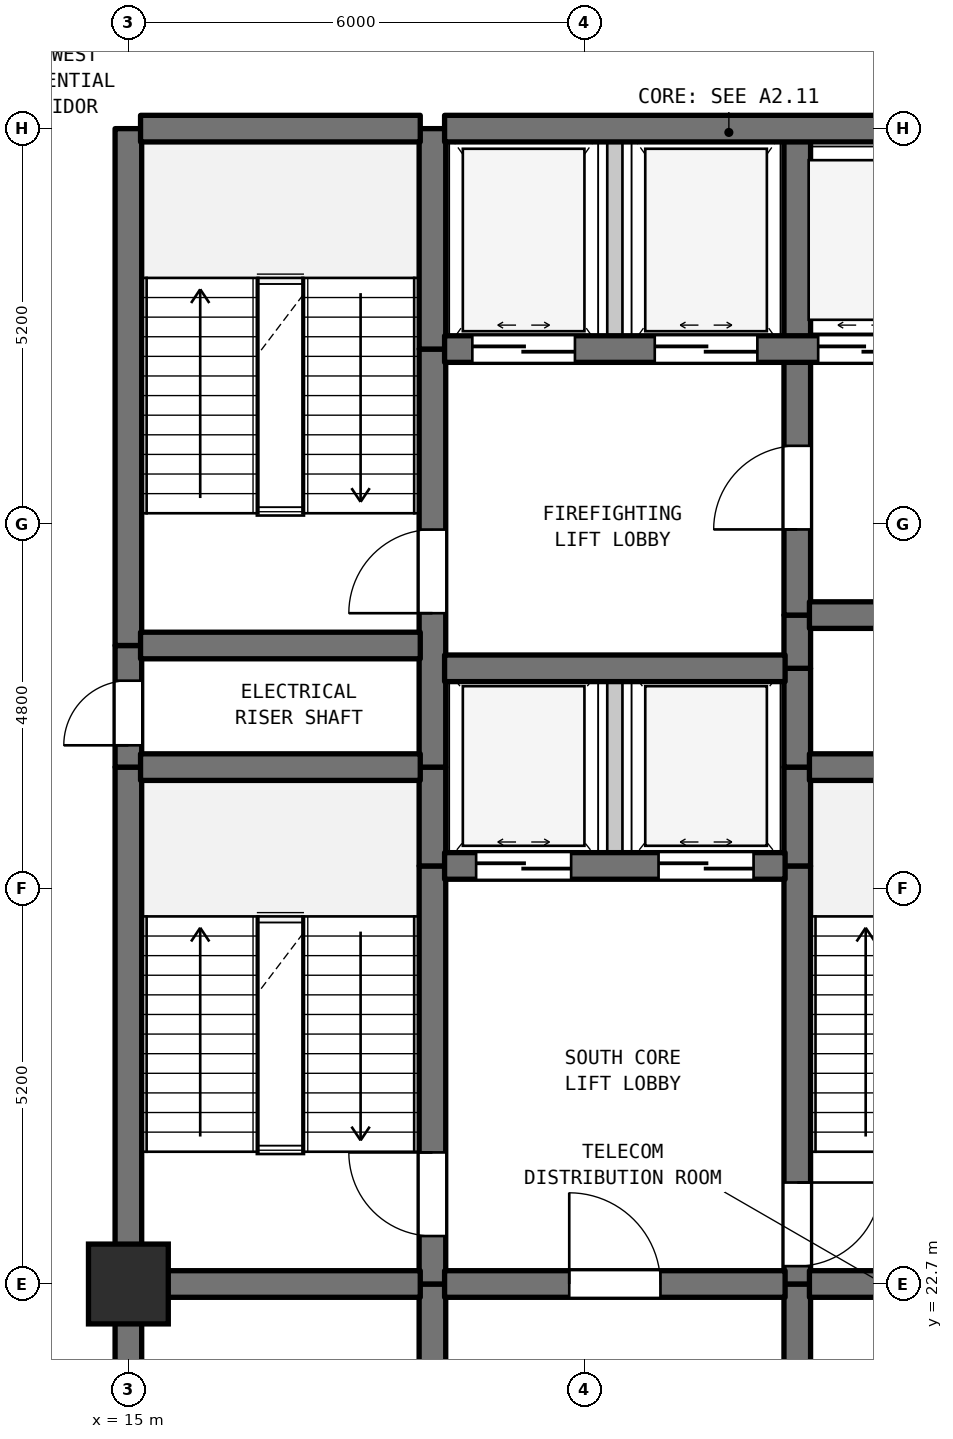
"""IFC4 building model, lengths in metres.
Left out: names, types, materials, properties, quantities, classifications, styles, units other than length and angle.
Written with IfcOpenShell. Run it as: python <this file> out.ifc"""

import sys

from ifc_helpers import new_model, si_unit, direction, frame, frame_2d, origin, origin_2d, place, context, subcontext, project, spatial, rectangle, extrude, element, fill, save


model = new_model("IFC4")
c1 = context("Model", 3, precision=1e-05, world=origin(), true_north=direction((0.0, 1.0)))
c2 = subcontext(c1, "Body", "Model", "MODEL_VIEW")
j1 = project(units=[si_unit("LENGTHUNIT", "METRE"), si_unit("PLANEANGLEUNIT", "RADIAN")], contexts=[c1])
p1 = place(None, origin())
s1 = spatial("IfcSite", under=j1, at=p1, CompositionType="ELEMENT")
p2 = place(p1, origin())
s2 = spatial("IfcBuilding", under=s1, at=p2, CompositionType="ELEMENT")
p3 = place(p2, frame((0.0, 0.0, 120.5)))
s3 = spatial("IfcBuildingStorey", under=s2, at=p3, CompositionType="ELEMENT", Elevation=120.5)
p4 = place(p3, frame((15.0, 22.7, 0.0), z_axis=(0.0, 0.0, 1.0), x_axis=(1.0, 0.0, 0.0)))
e1 = element("IfcColumn", 1, at=p4, inside=s3, PredefinedType="COLUMN", context=c2, shape_type="SweptSolid", body=[
    extrude(rectangle(XDim=1.05, YDim=1.05, at=origin_2d()), origin(), (0.0, 0.0, 1.0), 4.8),
])
p5 = place(p3, frame((15.0, 19.5, 0.0), z_axis=(0.0, 0.0, 1.0), x_axis=(0.0, 1.0, 0.0)))
e2 = element("IfcWall", 2, at=p5, inside=s3, PredefinedType="SHEAR", context=c2, shape_type="SweptSolid", body=[
    extrude(rectangle(XDim=3.2, YDim=0.35, at=frame_2d((1.6, 0.0))), origin(), (0.0, 0.0, 1.0), 4.48),
])
p6 = place(p3, frame((15.0, 22.7, 0.0), z_axis=(0.0, 0.0, 1.0), x_axis=(0.0, 1.0, 0.0)))
e3 = element("IfcWall", 3, at=p6, inside=s3, PredefinedType="SHEAR", context=c2, shape_type="SweptSolid", body=[
    extrude(rectangle(XDim=6.8, YDim=0.35, at=frame_2d((3.4, 0.0))), origin(), (0.0, 0.0, 1.0), 4.48),
])
p7 = place(p3, frame((15.0, 29.5, 0.0), z_axis=(0.0, 0.0, 1.0), x_axis=(0.0, 1.0, 0.0)))
e4 = element("IfcWall", 4, at=p7, inside=s3, PredefinedType="SHEAR", context=c2, shape_type="SweptSolid", body=[
    extrude(rectangle(XDim=1.6, YDim=0.35, at=frame_2d((0.8, 0.0))), origin(), (0.0, 0.0, 1.0), 4.48),
])
p8 = place(p7, frame((0.287, 0.0, 0.0)))
e5 = element("IfcOpeningElement", 5, at=p8, cuts=e4, PredefinedType="OPENING", context=c2, shape_type="SweptSolid", body=[
    extrude(rectangle(XDim=0.85, YDim=2.1, at=frame_2d((0.425, 1.05))), frame((0.0, 0.185, 0.0), z_axis=(0.0, -1.0, 0.0), x_axis=(1.0, 0.0, 0.0)), (0.0, 0.0, 1.0), 0.37),
])
p9 = place(p3, frame((15.0, 31.1, 0.0), z_axis=(0.0, 0.0, 1.0), x_axis=(0.0, 1.0, 0.0)))
e6 = element("IfcWall", 6, at=p9, inside=s3, PredefinedType="SHEAR", context=c2, shape_type="SweptSolid", body=[
    extrude(rectangle(XDim=6.8, YDim=0.35, at=frame_2d((3.4, 0.0))), origin(), (0.0, 0.0, 1.0), 4.48),
])
p10 = place(p3, frame((19.0, 19.5, 0.0), z_axis=(0.0, 0.0, 1.0), x_axis=(0.0, 1.0, 0.0)))
e7 = element("IfcWall", 7, at=p10, inside=s3, PredefinedType="SHEAR", context=c2, shape_type="SweptSolid", body=[
    extrude(rectangle(XDim=3.2, YDim=0.35, at=frame_2d((1.6, 0.0))), origin(), (0.0, 0.0, 1.0), 4.48),
])
p11 = place(p3, frame((19.0, 22.7, 0.0), z_axis=(0.0, 0.0, 1.0), x_axis=(0.0, 1.0, 0.0)))
e8 = element("IfcWall", 8, at=p11, inside=s3, PredefinedType="SHEAR", context=c2, shape_type="SweptSolid", body=[
    extrude(rectangle(XDim=5.5, YDim=0.35, at=frame_2d((2.75, 0.0))), origin(), (0.0, 0.0, 1.0), 4.48),
])
p12 = place(p11, frame((0.631, 0.0, 0.0)))
e9 = element("IfcOpeningElement", 9, at=p12, cuts=e8, PredefinedType="OPENING", context=c2, shape_type="SweptSolid", body=[
    extrude(rectangle(XDim=1.1, YDim=2.15, at=frame_2d((0.55, 1.075))), frame((0.0, 0.185, 0.0), z_axis=(0.0, -1.0, 0.0), x_axis=(1.0, 0.0, 0.0)), (0.0, 0.0, 1.0), 0.37),
])
p13 = place(p3, frame((19.0, 28.2, 0.0), z_axis=(0.0, 0.0, 1.0), x_axis=(0.0, 1.0, 0.0)))
e10 = element("IfcWall", 10, at=p13, inside=s3, PredefinedType="SHEAR", context=c2, shape_type="SweptSolid", body=[
    extrude(rectangle(XDim=1.3, YDim=0.35, at=frame_2d((0.65, 0.0))), origin(), (0.0, 0.0, 1.0), 4.48),
])
p14 = place(p3, frame((19.0, 29.5, 0.0), z_axis=(0.0, 0.0, 1.0), x_axis=(0.0, 1.0, 0.0)))
e11 = element("IfcWall", 11, at=p14, inside=s3, PredefinedType="SHEAR", context=c2, shape_type="SweptSolid", body=[
    extrude(rectangle(XDim=5.5, YDim=0.35, at=frame_2d((2.75, 0.0))), origin(), (0.0, 0.0, 1.0), 4.48),
])
p15 = place(p14, frame((2.025, 0.0, 0.0)))
e12 = element("IfcOpeningElement", 12, at=p15, cuts=e11, PredefinedType="OPENING", context=c2, shape_type="SweptSolid", body=[
    extrude(rectangle(XDim=1.1, YDim=2.15, at=frame_2d((0.55, 1.075))), frame((0.0, 0.185, 0.0), z_axis=(0.0, -1.0, 0.0), x_axis=(1.0, 0.0, 0.0)), (0.0, 0.0, 1.0), 0.37),
])
p16 = place(p3, frame((19.0, 35.0, 0.0), z_axis=(0.0, 0.0, 1.0), x_axis=(0.0, 1.0, 0.0)))
e13 = element("IfcWall", 13, at=p16, inside=s3, PredefinedType="SHEAR", context=c2, shape_type="SweptSolid", body=[
    extrude(rectangle(XDim=2.9, YDim=0.35, at=frame_2d((1.45, 0.0))), origin(), (0.0, 0.0, 1.0), 4.48),
])
p17 = place(p3, frame((21.4, 28.2, 0.0), z_axis=(0.0, 0.0, 1.0), x_axis=(0.0, 1.0, 0.0)))
e14 = element("IfcWall", 14, at=p17, inside=s3, PredefinedType="STANDARD", context=c2, shape_type="SweptSolid", body=[
    extrude(rectangle(XDim=2.6, YDim=0.2, at=frame_2d((1.3, 0.0))), origin(), (0.0, 0.0, 1.0), 4.48),
])
p18 = place(p3, frame((21.4, 35.0, 0.0), z_axis=(0.0, 0.0, 1.0), x_axis=(0.0, 1.0, 0.0)))
e15 = element("IfcWall", 15, at=p18, inside=s3, PredefinedType="STANDARD", context=c2, shape_type="SweptSolid", body=[
    extrude(rectangle(XDim=2.9, YDim=0.2, at=frame_2d((1.45, 0.0))), origin(), (0.0, 0.0, 1.0), 4.48),
])
p19 = place(p3, frame((23.8, 19.5, 0.0), z_axis=(0.0, 0.0, 1.0), x_axis=(0.0, 1.0, 0.0)))
e16 = element("IfcWall", 16, at=p19, inside=s3, PredefinedType="SHEAR", context=c2, shape_type="SweptSolid", body=[
    extrude(rectangle(XDim=3.2, YDim=0.35, at=frame_2d((1.6, 0.0))), origin(), (0.0, 0.0, 1.0), 4.48),
])
p20 = place(p3, frame((23.8, 22.7, 0.0), z_axis=(0.0, 0.0, 1.0), x_axis=(0.0, 1.0, 0.0)))
e17 = element("IfcWall", 17, at=p20, inside=s3, PredefinedType="SHEAR", context=c2, shape_type="SweptSolid", body=[
    extrude(rectangle(XDim=5.5, YDim=0.35, at=frame_2d((2.75, 0.0))), origin(), (0.0, 0.0, 1.0), 4.48),
])
p21 = place(p20, frame((0.235, 0.0, 0.0)))
e18 = element("IfcOpeningElement", 18, at=p21, cuts=e17, PredefinedType="OPENING", context=c2, shape_type="SweptSolid", body=[
    extrude(rectangle(XDim=1.1, YDim=2.15, at=frame_2d((0.55, 1.075))), frame((0.0, 0.185, 0.0), z_axis=(0.0, -1.0, 0.0), x_axis=(1.0, 0.0, 0.0)), (0.0, 0.0, 1.0), 0.37),
])
for number, where, z_axis, x_axis in (
    (19, (23.8, 28.2, 0.0), (0.0, 0.0, 1.0), (0.0, 1.0, 0.0)),
    (20, (23.8, 29.5, 0.0), (0.0, 0.0, 1.0), (0.0, 1.0, 0.0)),
):
    element("IfcWall", number, at=place(p3, frame(where, z_axis=z_axis, x_axis=x_axis)), inside=s3, PredefinedType="SHEAR", context=c2, shape_type="SweptSolid", body=[
        extrude(rectangle(XDim=1.3, YDim=0.35, at=frame_2d((0.65, 0.0))), origin(), (0.0, 0.0, 1.0), 4.48),
    ])
p22 = place(p3, frame((23.8, 30.8, 0.0), z_axis=(0.0, 0.0, 1.0), x_axis=(0.0, 1.0, 0.0)))
e21 = element("IfcWall", 21, at=p22, inside=s3, PredefinedType="SHEAR", context=c2, shape_type="SweptSolid", body=[
    extrude(rectangle(XDim=0.7, YDim=0.35, at=frame_2d((0.35, 0.0))), origin(), (0.0, 0.0, 1.0), 4.48),
])
p23 = place(p3, frame((23.8, 31.5, 0.0), z_axis=(0.0, 0.0, 1.0), x_axis=(0.0, 1.0, 0.0)))
e22 = element("IfcWall", 22, at=p23, inside=s3, PredefinedType="SHEAR", context=c2, shape_type="SweptSolid", body=[
    extrude(rectangle(XDim=3.5, YDim=0.35, at=frame_2d((1.75, 0.0))), origin(), (0.0, 0.0, 1.0), 4.48),
])
p24 = place(p23, frame((1.127, 0.0, 0.0)))
e23 = element("IfcOpeningElement", 23, at=p24, cuts=e22, PredefinedType="OPENING", context=c2, shape_type="SweptSolid", body=[
    extrude(rectangle(XDim=1.1, YDim=2.15, at=frame_2d((0.55, 1.075))), frame((0.0, 0.185, 0.0), z_axis=(0.0, -1.0, 0.0), x_axis=(1.0, 0.0, 0.0)), (0.0, 0.0, 1.0), 0.37),
])
p25 = place(p3, frame((23.8, 35.0, 0.0), z_axis=(0.0, 0.0, 1.0), x_axis=(0.0, 1.0, 0.0)))
e24 = element("IfcWall", 24, at=p25, inside=s3, PredefinedType="SHEAR", context=c2, shape_type="SweptSolid", body=[
    extrude(rectangle(XDim=2.9, YDim=0.35, at=frame_2d((1.45, 0.0))), origin(), (0.0, 0.0, 1.0), 4.48),
])
p26 = place(p3, frame((15.16, 22.7, 0.0), z_axis=(0.0, 0.0, 1.0), x_axis=(1.0, 0.0, 0.0)))
e25 = element("IfcWall", 25, at=p26, inside=s3, PredefinedType="SHEAR", context=c2, shape_type="SweptSolid", body=[
    extrude(rectangle(XDim=3.68, YDim=0.35, at=frame_2d((1.84, 0.0))), origin(), (0.0, 0.0, 1.0), 4.48),
])
p27 = place(p3, frame((19.16, 22.7, 0.0), z_axis=(0.0, 0.0, 1.0), x_axis=(1.0, 0.0, 0.0)))
e26 = element("IfcWall", 26, at=p27, inside=s3, PredefinedType="SHEAR", context=c2, shape_type="SweptSolid", body=[
    extrude(rectangle(XDim=4.48, YDim=0.35, at=frame_2d((2.24, 0.0))), origin(), (0.0, 0.0, 1.0), 4.48),
])
p28 = place(p27, frame((1.64, 0.0, 0.0)))
e27 = element("IfcOpeningElement", 27, at=p28, cuts=e26, PredefinedType="OPENING", context=c2, shape_type="SweptSolid", body=[
    extrude(rectangle(XDim=1.2, YDim=2.2, at=frame_2d((0.6, 1.1))), frame((0.0, 0.185, 0.0), z_axis=(0.0, -1.0, 0.0), x_axis=(1.0, 0.0, 0.0)), (0.0, 0.0, 1.0), 0.37),
])
p29 = place(p3, frame((23.96, 22.7, 0.0), z_axis=(0.0, 0.0, 1.0), x_axis=(1.0, 0.0, 0.0)))
e28 = element("IfcWall", 28, at=p29, inside=s3, PredefinedType="SHEAR", context=c2, shape_type="SweptSolid", body=[
    extrude(rectangle(XDim=3.18, YDim=0.35, at=frame_2d((1.59, 0.0))), origin(), (0.0, 0.0, 1.0), 4.48),
])
p30 = place(p3, frame((19.16, 28.2, 0.0), z_axis=(0.0, 0.0, 1.0), x_axis=(1.0, 0.0, 0.0)))
e29 = element("IfcWall", 29, at=p30, inside=s3, PredefinedType="SHEAR", context=c2, shape_type="SweptSolid", body=[
    extrude(rectangle(XDim=4.48, YDim=0.35, at=frame_2d((2.24, 0.0))), origin(), (0.0, 0.0, 1.0), 4.48),
])
p31 = place(p30, frame((0.415, 0.0, 0.0)))
e30 = element("IfcOpeningElement", 30, at=p31, cuts=e29, PredefinedType="OPENING", context=c2, shape_type="SweptSolid", body=[
    extrude(rectangle(XDim=1.25, YDim=2.2, at=frame_2d((0.625, 1.1))), frame((0.0, 0.185, 0.0), z_axis=(0.0, -1.0, 0.0), x_axis=(1.0, 0.0, 0.0)), (0.0, 0.0, 1.0), 0.37),
])
p32 = place(p30, frame((2.815, 0.0, 0.0)))
e31 = element("IfcOpeningElement", 31, at=p32, cuts=e29, PredefinedType="OPENING", context=c2, shape_type="SweptSolid", body=[
    extrude(rectangle(XDim=1.25, YDim=2.2, at=frame_2d((0.625, 1.1))), frame((0.0, 0.185, 0.0), z_axis=(0.0, -1.0, 0.0), x_axis=(1.0, 0.0, 0.0)), (0.0, 0.0, 1.0), 0.37),
])
p33 = place(p3, frame((15.16, 29.5, 0.0), z_axis=(0.0, 0.0, 1.0), x_axis=(1.0, 0.0, 0.0)))
e32 = element("IfcWall", 32, at=p33, inside=s3, PredefinedType="SHEAR", context=c2, shape_type="SweptSolid", body=[
    extrude(rectangle(XDim=3.68, YDim=0.35, at=frame_2d((1.84, 0.0))), origin(), (0.0, 0.0, 1.0), 4.48),
])
p34 = place(p3, frame((23.96, 29.5, 0.0), z_axis=(0.0, 0.0, 1.0), x_axis=(1.0, 0.0, 0.0)))
e33 = element("IfcWall", 33, at=p34, inside=s3, PredefinedType="SHEAR", context=c2, shape_type="SweptSolid", body=[
    extrude(rectangle(XDim=3.18, YDim=0.35, at=frame_2d((1.59, 0.0))), origin(), (0.0, 0.0, 1.0), 4.48),
])
p35 = place(p3, frame((19.16, 30.8, 0.0), z_axis=(0.0, 0.0, 1.0), x_axis=(1.0, 0.0, 0.0)))
e34 = element("IfcWall", 34, at=p35, inside=s3, PredefinedType="SHEAR", context=c2, shape_type="SweptSolid", body=[
    extrude(rectangle(XDim=4.48, YDim=0.35, at=frame_2d((2.24, 0.0))), origin(), (0.0, 0.0, 1.0), 4.48),
])
p36 = place(p3, frame((15.16, 31.1, 0.0), z_axis=(0.0, 0.0, 1.0), x_axis=(1.0, 0.0, 0.0)))
e35 = element("IfcWall", 35, at=p36, inside=s3, PredefinedType="SHEAR", context=c2, shape_type="SweptSolid", body=[
    extrude(rectangle(XDim=3.68, YDim=0.35, at=frame_2d((1.84, 0.0))), origin(), (0.0, 0.0, 1.0), 4.48),
])
p37 = place(p3, frame((23.96, 31.5, 0.0), z_axis=(0.0, 0.0, 1.0), x_axis=(1.0, 0.0, 0.0)))
e36 = element("IfcWall", 36, at=p37, inside=s3, PredefinedType="SHEAR", context=c2, shape_type="SweptSolid", body=[
    extrude(rectangle(XDim=3.18, YDim=0.35, at=frame_2d((1.59, 0.0))), origin(), (0.0, 0.0, 1.0), 4.48),
])
p38 = place(p37, frame((1.094, 0.0, 0.0)))
e37 = element("IfcOpeningElement", 37, at=p38, cuts=e36, PredefinedType="OPENING", context=c2, shape_type="SweptSolid", body=[
    extrude(rectangle(XDim=0.85, YDim=2.1, at=frame_2d((0.425, 1.05))), frame((0.0, 0.185, 0.0), z_axis=(0.0, -1.0, 0.0), x_axis=(1.0, 0.0, 0.0)), (0.0, 0.0, 1.0), 0.37),
])
p39 = place(p3, frame((19.16, 35.0, 0.0), z_axis=(0.0, 0.0, 1.0), x_axis=(1.0, 0.0, 0.0)))
e38 = element("IfcWall", 38, at=p39, inside=s3, PredefinedType="SHEAR", context=c2, shape_type="SweptSolid", body=[
    extrude(rectangle(XDim=11.48, YDim=0.35, at=frame_2d((5.74, 0.0))), origin(), (0.0, 0.0, 1.0), 4.48),
])
p40 = place(p39, frame((0.365, 0.0, 0.0)))
e39 = element("IfcOpeningElement", 39, at=p40, cuts=e38, PredefinedType="OPENING", context=c2, shape_type="SweptSolid", body=[
    extrude(rectangle(XDim=1.35, YDim=2.2, at=frame_2d((0.675, 1.1))), frame((0.0, 0.185, 0.0), z_axis=(0.0, -1.0, 0.0), x_axis=(1.0, 0.0, 0.0)), (0.0, 0.0, 1.0), 0.37),
])
p41 = place(p39, frame((2.765, 0.0, 0.0)))
e40 = element("IfcOpeningElement", 40, at=p41, cuts=e38, PredefinedType="OPENING", context=c2, shape_type="SweptSolid", body=[
    extrude(rectangle(XDim=1.35, YDim=2.2, at=frame_2d((0.675, 1.1))), frame((0.0, 0.185, 0.0), z_axis=(0.0, -1.0, 0.0), x_axis=(1.0, 0.0, 0.0)), (0.0, 0.0, 1.0), 0.37),
])
p42 = place(p39, frame((4.915, 0.0, 0.0)))
e41 = element("IfcOpeningElement", 41, at=p42, cuts=e38, PredefinedType="OPENING", context=c2, shape_type="SweptSolid", body=[
    extrude(rectangle(XDim=1.2, YDim=2.2, at=frame_2d((0.6, 1.1))), frame((0.0, 0.185, 0.0), z_axis=(0.0, -1.0, 0.0), x_axis=(1.0, 0.0, 0.0)), (0.0, 0.0, 1.0), 0.37),
])
p43 = place(p39, frame((6.665, 0.0, 0.0)))
e42 = element("IfcOpeningElement", 42, at=p43, cuts=e38, PredefinedType="OPENING", context=c2, shape_type="SweptSolid", body=[
    extrude(rectangle(XDim=1.2, YDim=2.2, at=frame_2d((0.6, 1.1))), frame((0.0, 0.185, 0.0), z_axis=(0.0, -1.0, 0.0), x_axis=(1.0, 0.0, 0.0)), (0.0, 0.0, 1.0), 0.37),
])
p44 = place(p39, frame((8.415, 0.0, 0.0)))
e43 = element("IfcOpeningElement", 43, at=p44, cuts=e38, PredefinedType="OPENING", context=c2, shape_type="SweptSolid", body=[
    extrude(rectangle(XDim=1.2, YDim=2.2, at=frame_2d((0.6, 1.1))), frame((0.0, 0.185, 0.0), z_axis=(0.0, -1.0, 0.0), x_axis=(1.0, 0.0, 0.0)), (0.0, 0.0, 1.0), 0.37),
])
p45 = place(p39, frame((10.16, 0.0, 0.0)))
e44 = element("IfcOpeningElement", 44, at=p45, cuts=e38, PredefinedType="OPENING", context=c2, shape_type="SweptSolid", body=[
    extrude(rectangle(XDim=1.2, YDim=2.2, at=frame_2d((0.6, 1.1))), frame((0.0, 0.185, 0.0), z_axis=(0.0, -1.0, 0.0), x_axis=(1.0, 0.0, 0.0)), (0.0, 0.0, 1.0), 0.37),
])
p46 = place(p3, frame((15.16, 37.9, 0.0), z_axis=(0.0, 0.0, 1.0), x_axis=(1.0, 0.0, 0.0)))
e45 = element("IfcWall", 45, at=p46, inside=s3, PredefinedType="SHEAR", context=c2, shape_type="SweptSolid", body=[
    extrude(rectangle(XDim=3.68, YDim=0.35, at=frame_2d((1.84, 0.0))), origin(), (0.0, 0.0, 1.0), 4.48),
])
p47 = place(p3, frame((19.16, 37.9, 0.0), z_axis=(0.0, 0.0, 1.0), x_axis=(1.0, 0.0, 0.0)))
e46 = element("IfcWall", 46, at=p47, inside=s3, PredefinedType="SHEAR", context=c2, shape_type="SweptSolid", body=[
    extrude(rectangle(XDim=11.48, YDim=0.35, at=frame_2d((5.74, 0.0))), origin(), (0.0, 0.0, 1.0), 4.48),
])
p48 = place(p8, origin())
e47 = element("IfcDoor", 47, at=p48, inside=s3, OperationType="SINGLE_SWING_LEFT", PredefinedType="DOOR", context=c2, shape_type="SweptSolid", body=[
    extrude(rectangle(XDim=0.85, YDim=2.1, at=frame_2d((0.425, 1.05))), frame((0.0, 0.025, 0.0), z_axis=(0.0, -1.0, 0.0), x_axis=(1.0, 0.0, 0.0)), (0.0, 0.0, 1.0), 0.05),
])
fill(e5, e47)
p49 = place(p12, origin())
e48 = element("IfcDoor", 48, at=p49, inside=s3, OperationType="SINGLE_SWING_RIGHT", PredefinedType="DOOR", context=c2, shape_type="SweptSolid", body=[
    extrude(rectangle(XDim=1.1, YDim=2.15, at=frame_2d((0.55, 1.075))), frame((0.0, 0.025, 0.0), z_axis=(0.0, -1.0, 0.0), x_axis=(1.0, 0.0, 0.0)), (0.0, 0.0, 1.0), 0.05),
])
fill(e9, e48)
p50 = place(p15, origin())
e49 = element("IfcDoor", 49, at=p50, inside=s3, OperationType="SINGLE_SWING_LEFT", PredefinedType="DOOR", context=c2, shape_type="SweptSolid", body=[
    extrude(rectangle(XDim=1.1, YDim=2.15, at=frame_2d((0.55, 1.075))), frame((0.0, 0.025, 0.0), z_axis=(0.0, -1.0, 0.0), x_axis=(1.0, 0.0, 0.0)), (0.0, 0.0, 1.0), 0.05),
])
fill(e12, e49)
p51 = place(p21, frame((1.1, 0.0, 0.0), z_axis=(0.0, 0.0, 1.0), x_axis=(-1.0, 0.0, 0.0)))
e50 = element("IfcDoor", 50, at=p51, inside=s3, OperationType="SINGLE_SWING_RIGHT", PredefinedType="DOOR", context=c2, shape_type="SweptSolid", body=[
    extrude(rectangle(XDim=1.1, YDim=2.15, at=frame_2d((0.55, 1.075))), frame((0.0, 0.025, 0.0), z_axis=(0.0, -1.0, 0.0), x_axis=(1.0, 0.0, 0.0)), (0.0, 0.0, 1.0), 0.05),
])
fill(e18, e50)
p52 = place(p24, origin())
e51 = element("IfcDoor", 51, at=p52, inside=s3, OperationType="SINGLE_SWING_LEFT", PredefinedType="DOOR", context=c2, shape_type="SweptSolid", body=[
    extrude(rectangle(XDim=1.1, YDim=2.15, at=frame_2d((0.55, 1.075))), frame((0.0, 0.025, 0.0), z_axis=(0.0, -1.0, 0.0), x_axis=(1.0, 0.0, 0.0)), (0.0, 0.0, 1.0), 0.05),
])
fill(e23, e51)
p53 = place(p28, origin())
e52 = element("IfcDoor", 52, at=p53, inside=s3, OperationType="SINGLE_SWING_LEFT", PredefinedType="DOOR", context=c2, shape_type="SweptSolid", body=[
    extrude(rectangle(XDim=1.2, YDim=2.2, at=frame_2d((0.6, 1.1))), frame((0.0, 0.025, 0.0), z_axis=(0.0, -1.0, 0.0), x_axis=(1.0, 0.0, 0.0)), (0.0, 0.0, 1.0), 0.05),
])
fill(e27, e52)
p54 = place(p31, origin())
e53 = element("IfcDoor", 53, at=p54, inside=s3, OperationType="DOUBLE_DOOR_SLIDING", PredefinedType="DOOR", context=c2, shape_type="SweptSolid", body=[
    extrude(rectangle(XDim=1.25, YDim=2.2, at=frame_2d((0.625, 1.1))), frame((0.0, 0.025, 0.0), z_axis=(0.0, -1.0, 0.0), x_axis=(1.0, 0.0, 0.0)), (0.0, 0.0, 1.0), 0.05),
])
fill(e30, e53)
p55 = place(p32, origin())
e54 = element("IfcDoor", 54, at=p55, inside=s3, OperationType="DOUBLE_DOOR_SLIDING", PredefinedType="DOOR", context=c2, shape_type="SweptSolid", body=[
    extrude(rectangle(XDim=1.25, YDim=2.2, at=frame_2d((0.625, 1.1))), frame((0.0, 0.025, 0.0), z_axis=(0.0, -1.0, 0.0), x_axis=(1.0, 0.0, 0.0)), (0.0, 0.0, 1.0), 0.05),
])
fill(e31, e54)
p56 = place(p40, origin())
e55 = element("IfcDoor", 55, at=p56, inside=s3, OperationType="DOUBLE_DOOR_SLIDING", PredefinedType="DOOR", context=c2, shape_type="SweptSolid", body=[
    extrude(rectangle(XDim=1.35, YDim=2.2, at=frame_2d((0.675, 1.1))), frame((0.0, 0.025, 0.0), z_axis=(0.0, -1.0, 0.0), x_axis=(1.0, 0.0, 0.0)), (0.0, 0.0, 1.0), 0.05),
])
fill(e39, e55)
p57 = place(p41, origin())
e56 = element("IfcDoor", 56, at=p57, inside=s3, OperationType="DOUBLE_DOOR_SLIDING", PredefinedType="DOOR", context=c2, shape_type="SweptSolid", body=[
    extrude(rectangle(XDim=1.35, YDim=2.2, at=frame_2d((0.675, 1.1))), frame((0.0, 0.025, 0.0), z_axis=(0.0, -1.0, 0.0), x_axis=(1.0, 0.0, 0.0)), (0.0, 0.0, 1.0), 0.05),
])
fill(e40, e56)
p58 = place(p42, origin())
e57 = element("IfcDoor", 57, at=p58, inside=s3, OperationType="DOUBLE_DOOR_SLIDING", PredefinedType="DOOR", context=c2, shape_type="SweptSolid", body=[
    extrude(rectangle(XDim=1.2, YDim=2.2, at=frame_2d((0.6, 1.1))), frame((0.0, 0.025, 0.0), z_axis=(0.0, -1.0, 0.0), x_axis=(1.0, 0.0, 0.0)), (0.0, 0.0, 1.0), 0.05),
])
fill(e41, e57)
save(model, sys.argv[1])
